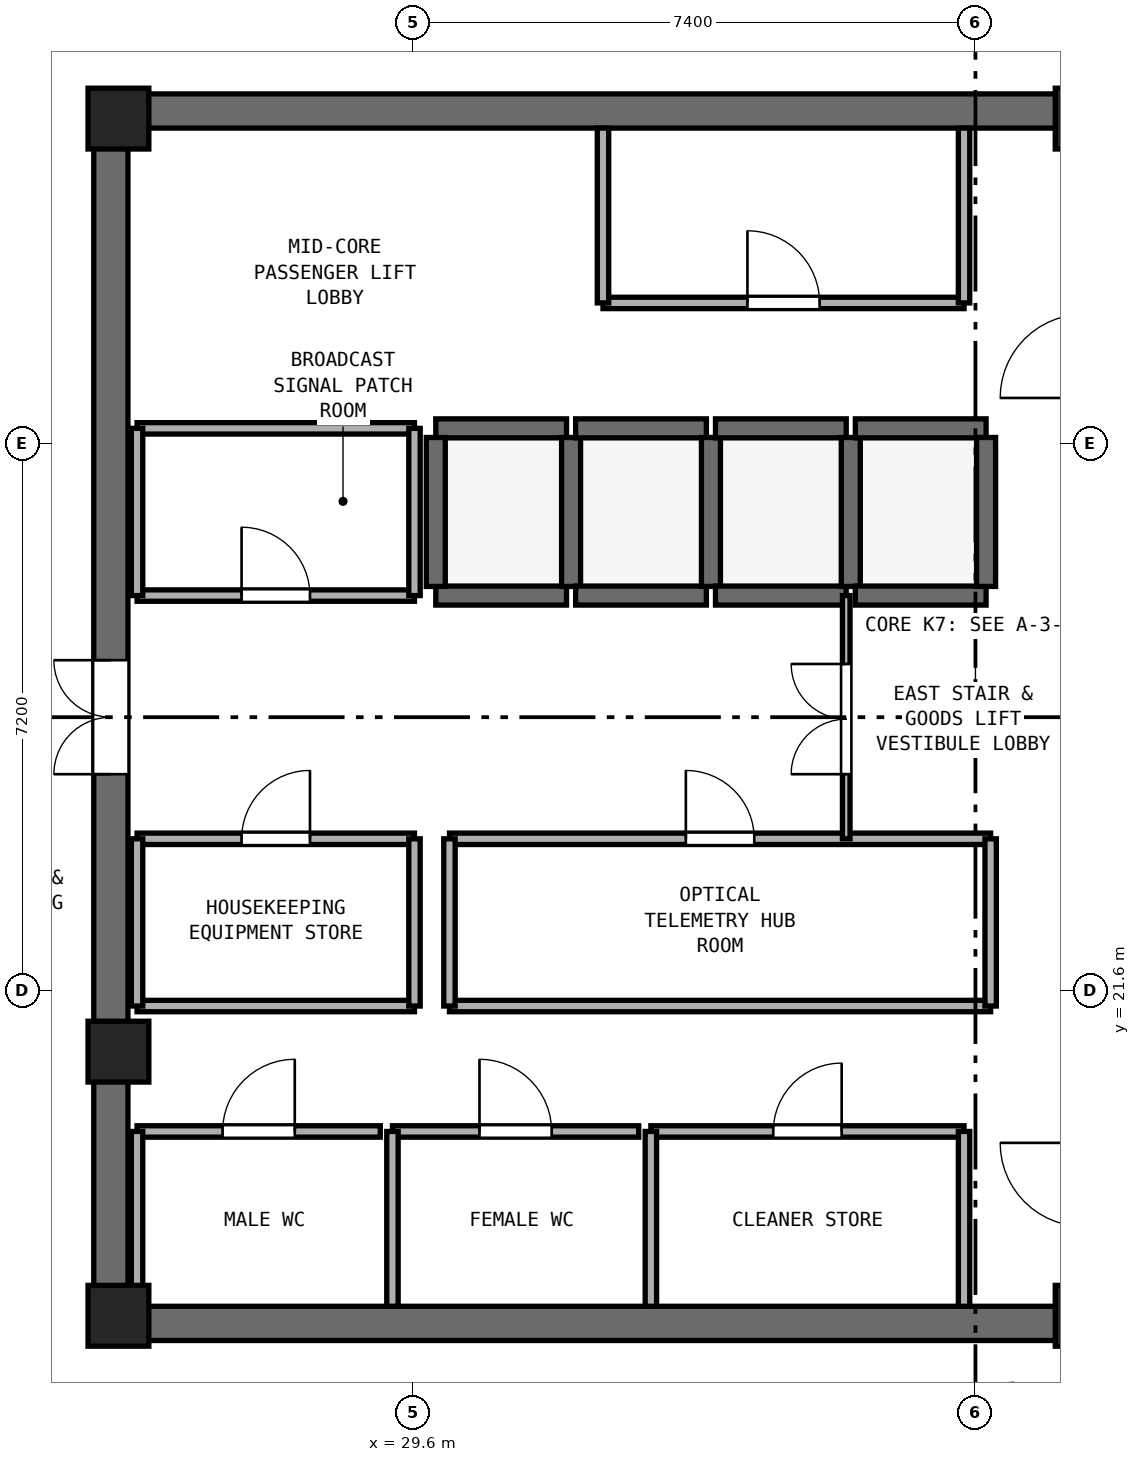
"""IFC4 building model, lengths in metres.
Left out: names, types, materials, properties, quantities, classifications, styles, units other than length and angle.
Written with IfcOpenShell. Run it as: python <this file> out.ifc"""

import sys

from ifc_helpers import new_model, si_unit, direction, frame, frame_2d, origin, origin_2d, place, context, subcontext, project, spatial, rectangle, extrude, element, fill, save


model = new_model("IFC4")
c1 = context("Model", 3, precision=1e-05, world=origin(), true_north=direction((0.0, 1.0)))
c2 = subcontext(c1, "Body", "Model", "MODEL_VIEW")
j1 = project(units=[si_unit("LENGTHUNIT", "METRE"), si_unit("PLANEANGLEUNIT", "RADIAN")], contexts=[c1])
p1 = place(None, origin())
s1 = spatial("IfcSite", under=j1, at=p1, CompositionType="ELEMENT")
p2 = place(p1, origin())
s2 = spatial("IfcBuilding", under=s1, at=p2, CompositionType="ELEMENT")
p3 = place(p2, frame((0.0, 0.0, 308.6)))
s3 = spatial("IfcBuildingStorey", under=s2, at=p3, CompositionType="ELEMENT", Elevation=308.6)
for number, where, z_axis, x_axis in (
    (1, (25.4, 17.225, 0.0), (0.0, 0.0, 1.0), (1.0, 0.0, 0.0)),
    (2, (25.4, 33.175, 0.0), (0.0, 0.0, 1.0), (1.0, 0.0, 0.0)),
):
    element("IfcWall", number, at=place(p3, frame(where, z_axis=z_axis, x_axis=x_axis)), inside=s3, PredefinedType="SHEAR", context=c2, shape_type="SweptSolid", body=[
        extrude(rectangle(XDim=23.2, YDim=0.45, at=frame_2d((11.6, 0.0))), origin(), (0.0, 0.0, 1.0), 4.52),
    ])
p4 = place(p3, frame((25.625, 17.45, 0.0), z_axis=(0.0, 0.0, 1.0), x_axis=(0.0, 1.0, 0.0)))
e3 = element("IfcWall", 3, at=p4, inside=s3, PredefinedType="SHEAR", context=c2, shape_type="SweptSolid", body=[
    extrude(rectangle(XDim=15.5, YDim=0.45, at=frame_2d((7.75, 0.0))), origin(), (0.0, 0.0, 1.0), 4.52),
])
p5 = place(p4, frame((7.0, 0.0, 0.0)))
e4 = element("IfcOpeningElement", 4, at=p5, cuts=e3, PredefinedType="OPENING", context=c2, shape_type="SweptSolid", body=[
    extrude(rectangle(XDim=1.5, YDim=2.15, at=frame_2d((0.75, 1.075))), frame((0.0, 0.235, 0.0), z_axis=(0.0, -1.0, 0.0), x_axis=(1.0, 0.0, 0.0)), (0.0, 0.0, 1.0), 0.47),
])
for number, where, z_axis, x_axis in (
    (5, (25.725, 17.325, 0.0), (0.0, 0.0, 1.0), (1.0, 0.0, 0.0)),
    (6, (38.45, 17.325, 0.0), (0.0, 0.0, 1.0), (1.0, 0.0, 0.0)),
    (7, (38.45, 33.075, 0.0), (0.0, 0.0, 1.0), (1.0, 0.0, 0.0)),
    (8, (25.725, 33.075, 0.0), (0.0, 0.0, 1.0), (1.0, 0.0, 0.0)),
    (9, (25.725, 20.8, 0.0), (0.0, 0.0, 1.0), (1.0, 0.0, 0.0)),
):
    element("IfcColumn", number, at=place(p3, frame(where, z_axis=z_axis, x_axis=x_axis)), inside=s3, PredefinedType="PILASTER", context=c2, shape_type="SweptSolid", body=[
        extrude(rectangle(XDim=0.8, YDim=0.8, at=origin_2d()), origin(), (0.0, 0.0, 1.0), 4.8),
    ])
for number, where, z_axis, x_axis in (
    (10, (29.9, 26.8, 0.0), (0.0, 0.0, 1.0), (1.0, 0.0, 0.0)),
    (11, (29.9, 29.0, 0.0), (0.0, 0.0, 1.0), (1.0, 0.0, 0.0)),
):
    element("IfcWall", number, at=place(p3, frame(where, z_axis=z_axis, x_axis=x_axis)), inside=s3, PredefinedType="SHEAR", context=c2, shape_type="SweptSolid", body=[
        extrude(rectangle(XDim=1.72, YDim=0.25, at=frame_2d((0.86, 0.0))), origin(), (0.0, 0.0, 1.0), 4.52),
    ])
for number, where, z_axis, x_axis in (
    (12, (29.9, 26.92, 0.0), (0.0, 0.0, 1.0), (0.0, 1.0, 0.0)),
    (13, (31.68, 26.92, 0.0), (0.0, 0.0, 1.0), (0.0, 1.0, 0.0)),
):
    element("IfcWall", number, at=place(p3, frame(where, z_axis=z_axis, x_axis=x_axis)), inside=s3, PredefinedType="SHEAR", context=c2, shape_type="SweptSolid", body=[
        extrude(rectangle(XDim=1.96, YDim=0.25, at=frame_2d((0.98, 0.0))), origin(), (0.0, 0.0, 1.0), 4.52),
    ])
for number, where, z_axis, x_axis in (
    (14, (31.74, 26.8, 0.0), (0.0, 0.0, 1.0), (1.0, 0.0, 0.0)),
    (15, (31.74, 29.0, 0.0), (0.0, 0.0, 1.0), (1.0, 0.0, 0.0)),
):
    element("IfcWall", number, at=place(p3, frame(where, z_axis=z_axis, x_axis=x_axis)), inside=s3, PredefinedType="SHEAR", context=c2, shape_type="SweptSolid", body=[
        extrude(rectangle(XDim=1.72, YDim=0.25, at=frame_2d((0.86, 0.0))), origin(), (0.0, 0.0, 1.0), 4.52),
    ])
p6 = place(p3, frame((33.52, 26.92, 0.0), z_axis=(0.0, 0.0, 1.0), x_axis=(0.0, 1.0, 0.0)))
e16 = element("IfcWall", 16, at=p6, inside=s3, PredefinedType="SHEAR", context=c2, shape_type="SweptSolid", body=[
    extrude(rectangle(XDim=1.96, YDim=0.25, at=frame_2d((0.98, 0.0))), origin(), (0.0, 0.0, 1.0), 4.52),
])
for number, where, z_axis, x_axis in (
    (17, (33.58, 26.8, 0.0), (0.0, 0.0, 1.0), (1.0, 0.0, 0.0)),
    (18, (33.58, 29.0, 0.0), (0.0, 0.0, 1.0), (1.0, 0.0, 0.0)),
):
    element("IfcWall", number, at=place(p3, frame(where, z_axis=z_axis, x_axis=x_axis)), inside=s3, PredefinedType="SHEAR", context=c2, shape_type="SweptSolid", body=[
        extrude(rectangle(XDim=1.72, YDim=0.25, at=frame_2d((0.86, 0.0))), origin(), (0.0, 0.0, 1.0), 4.52),
    ])
p7 = place(p3, frame((35.36, 26.92, 0.0), z_axis=(0.0, 0.0, 1.0), x_axis=(0.0, 1.0, 0.0)))
e19 = element("IfcWall", 19, at=p7, inside=s3, PredefinedType="SHEAR", context=c2, shape_type="SweptSolid", body=[
    extrude(rectangle(XDim=1.96, YDim=0.25, at=frame_2d((0.98, 0.0))), origin(), (0.0, 0.0, 1.0), 4.52),
])
for number, where, z_axis, x_axis in (
    (20, (35.42, 26.8, 0.0), (0.0, 0.0, 1.0), (1.0, 0.0, 0.0)),
    (21, (35.42, 29.0, 0.0), (0.0, 0.0, 1.0), (1.0, 0.0, 0.0)),
):
    element("IfcWall", number, at=place(p3, frame(where, z_axis=z_axis, x_axis=x_axis)), inside=s3, PredefinedType="SHEAR", context=c2, shape_type="SweptSolid", body=[
        extrude(rectangle(XDim=1.72, YDim=0.25, at=frame_2d((0.86, 0.0))), origin(), (0.0, 0.0, 1.0), 4.52),
    ])
p8 = place(p3, frame((37.14, 26.92, 0.0), z_axis=(0.0, 0.0, 1.0), x_axis=(0.0, 1.0, 0.0)))
e22 = element("IfcWall", 22, at=p8, inside=s3, PredefinedType="SHEAR", context=c2, shape_type="SweptSolid", body=[
    extrude(rectangle(XDim=1.96, YDim=0.25, at=frame_2d((0.98, 0.0))), origin(), (0.0, 0.0, 1.0), 4.52),
])
p9 = place(p3, frame((32.1, 30.65, 0.0), z_axis=(0.0, 0.0, 1.0), x_axis=(1.0, 0.0, 0.0)))
e23 = element("IfcWall", 23, at=p9, inside=s3, PredefinedType="PARTITIONING", context=c2, shape_type="SweptSolid", body=[
    extrude(rectangle(XDim=4.75, YDim=0.15, at=frame_2d((2.375, 0.0))), origin(), (0.0, 0.0, 1.0), 4.52),
])
p10 = place(p9, frame((1.9, 0.0, 0.0)))
e24 = element("IfcOpeningElement", 24, at=p10, cuts=e23, PredefinedType="OPENING", context=c2, shape_type="SweptSolid", body=[
    extrude(rectangle(XDim=0.95, YDim=2.1, at=frame_2d((0.475, 1.05))), frame((0.0, 0.085, 0.0), z_axis=(0.0, -1.0, 0.0), x_axis=(1.0, 0.0, 0.0)), (0.0, 0.0, 1.0), 0.17),
])
for number, where, z_axis, x_axis in (
    (25, (32.1, 30.65, 0.0), (0.0, 0.0, 1.0), (0.0, 1.0, 0.0)),
    (26, (36.85, 30.65, 0.0), (0.0, 0.0, 1.0), (0.0, 1.0, 0.0)),
):
    element("IfcWall", number, at=place(p3, frame(where, z_axis=z_axis, x_axis=x_axis)), inside=s3, PredefinedType="PARTITIONING", context=c2, shape_type="SweptSolid", body=[
        extrude(rectangle(XDim=2.3, YDim=0.15, at=frame_2d((1.15, 0.0))), origin(), (0.0, 0.0, 1.0), 4.52),
    ])
p11 = place(p3, frame((25.97, 19.75, 0.0), z_axis=(0.0, 0.0, 1.0), x_axis=(1.0, 0.0, 0.0)))
e27 = element("IfcWall", 27, at=p11, inside=s3, PredefinedType="PARTITIONING", context=c2, shape_type="SweptSolid", body=[
    extrude(rectangle(XDim=3.2, YDim=0.15, at=frame_2d((1.6, 0.0))), origin(), (0.0, 0.0, 1.0), 4.52),
])
p12 = place(p11, frame((1.125, 0.0, 0.0)))
e28 = element("IfcOpeningElement", 28, at=p12, cuts=e27, PredefinedType="OPENING", context=c2, shape_type="SweptSolid", body=[
    extrude(rectangle(XDim=0.95, YDim=2.1, at=frame_2d((0.475, 1.05))), frame((0.0, 0.085, 0.0), z_axis=(0.0, -1.0, 0.0), x_axis=(1.0, 0.0, 0.0)), (0.0, 0.0, 1.0), 0.17),
])
p13 = place(p3, frame((25.97, 17.45, 0.0), z_axis=(0.0, 0.0, 1.0), x_axis=(0.0, 1.0, 0.0)))
e29 = element("IfcWall", 29, at=p13, inside=s3, PredefinedType="PARTITIONING", context=c2, shape_type="SweptSolid", body=[
    extrude(rectangle(XDim=2.3, YDim=0.15, at=frame_2d((1.15, 0.0))), origin(), (0.0, 0.0, 1.0), 3.62),
])
p14 = place(p3, frame((29.33, 19.75, 0.0), z_axis=(0.0, 0.0, 1.0), x_axis=(1.0, 0.0, 0.0)))
e30 = element("IfcWall", 30, at=p14, inside=s3, PredefinedType="PARTITIONING", context=c2, shape_type="SweptSolid", body=[
    extrude(rectangle(XDim=3.24, YDim=0.15, at=frame_2d((1.62, 0.0))), origin(), (0.0, 0.0, 1.0), 4.52),
])
p15 = place(p14, frame((1.145, 0.0, 0.0)))
e31 = element("IfcOpeningElement", 31, at=p15, cuts=e30, PredefinedType="OPENING", context=c2, shape_type="SweptSolid", body=[
    extrude(rectangle(XDim=0.95, YDim=2.1, at=frame_2d((0.475, 1.05))), frame((0.0, 0.085, 0.0), z_axis=(0.0, -1.0, 0.0), x_axis=(1.0, 0.0, 0.0)), (0.0, 0.0, 1.0), 0.17),
])
p16 = place(p3, frame((29.33, 17.45, 0.0), z_axis=(0.0, 0.0, 1.0), x_axis=(0.0, 1.0, 0.0)))
e32 = element("IfcWall", 32, at=p16, inside=s3, PredefinedType="PARTITIONING", context=c2, shape_type="SweptSolid", body=[
    extrude(rectangle(XDim=2.3, YDim=0.15, at=frame_2d((1.15, 0.0))), origin(), (0.0, 0.0, 1.0), 4.52),
])
p17 = place(p3, frame((32.73, 19.75, 0.0), z_axis=(0.0, 0.0, 1.0), x_axis=(1.0, 0.0, 0.0)))
e33 = element("IfcWall", 33, at=p17, inside=s3, PredefinedType="PARTITIONING", context=c2, shape_type="SweptSolid", body=[
    extrude(rectangle(XDim=4.12, YDim=0.15, at=frame_2d((2.06, 0.0))), origin(), (0.0, 0.0, 1.0), 4.52),
])
p18 = place(p17, frame((1.61, 0.0, 0.0)))
e34 = element("IfcOpeningElement", 34, at=p18, cuts=e33, PredefinedType="OPENING", context=c2, shape_type="SweptSolid", body=[
    extrude(rectangle(XDim=0.9, YDim=2.1, at=frame_2d((0.45, 1.05))), frame((0.0, 0.085, 0.0), z_axis=(0.0, -1.0, 0.0), x_axis=(1.0, 0.0, 0.0)), (0.0, 0.0, 1.0), 0.17),
])
for number, where, z_axis, x_axis in (
    (35, (32.73, 17.45, 0.0), (0.0, 0.0, 1.0), (0.0, 1.0, 0.0)),
    (36, (36.85, 17.45, 0.0), (0.0, 0.0, 1.0), (0.0, 1.0, 0.0)),
):
    element("IfcWall", number, at=place(p3, frame(where, z_axis=z_axis, x_axis=x_axis)), inside=s3, PredefinedType="PARTITIONING", context=c2, shape_type="SweptSolid", body=[
        extrude(rectangle(XDim=2.3, YDim=0.15, at=frame_2d((1.15, 0.0))), origin(), (0.0, 0.0, 1.0), 4.52),
    ])
p19 = place(p3, frame((25.97, 26.8, 0.0), z_axis=(0.0, 0.0, 1.0), x_axis=(1.0, 0.0, 0.0)))
e37 = element("IfcWall", 37, at=p19, inside=s3, PredefinedType="PARTITIONING", context=c2, shape_type="SweptSolid", body=[
    extrude(rectangle(XDim=3.65, YDim=0.15, at=frame_2d((1.825, 0.0))), origin(), (0.0, 0.0, 1.0), 4.52),
])
p20 = place(p19, frame((1.375, 0.0, 0.0)))
e38 = element("IfcOpeningElement", 38, at=p20, cuts=e37, PredefinedType="OPENING", context=c2, shape_type="SweptSolid", body=[
    extrude(rectangle(XDim=0.9, YDim=2.1, at=frame_2d((0.45, 1.05))), frame((0.0, 0.085, 0.0), z_axis=(0.0, -1.0, 0.0), x_axis=(1.0, 0.0, 0.0)), (0.0, 0.0, 1.0), 0.17),
])
p21 = place(p3, frame((25.97, 29.0, 0.0), z_axis=(0.0, 0.0, 1.0), x_axis=(1.0, 0.0, 0.0)))
e39 = element("IfcWall", 39, at=p21, inside=s3, PredefinedType="PARTITIONING", context=c2, shape_type="SweptSolid", body=[
    extrude(rectangle(XDim=3.65, YDim=0.15, at=frame_2d((1.825, 0.0))), origin(), (0.0, 0.0, 1.0), 4.52),
])
p22 = place(p3, frame((25.97, 26.8, 0.0), z_axis=(0.0, 0.0, 1.0), x_axis=(0.0, 1.0, 0.0)))
e40 = element("IfcWall", 40, at=p22, inside=s3, PredefinedType="PARTITIONING", context=c2, shape_type="SweptSolid", body=[
    extrude(rectangle(XDim=2.2, YDim=0.15, at=frame_2d((1.1, 0.0))), origin(), (0.0, 0.0, 1.0), 3.62),
])
p23 = place(p3, frame((29.62, 26.8, 0.0), z_axis=(0.0, 0.0, 1.0), x_axis=(0.0, 1.0, 0.0)))
e41 = element("IfcWall", 41, at=p23, inside=s3, PredefinedType="PARTITIONING", context=c2, shape_type="SweptSolid", body=[
    extrude(rectangle(XDim=2.2, YDim=0.15, at=frame_2d((1.1, 0.0))), origin(), (0.0, 0.0, 1.0), 4.52),
])
p24 = place(p3, frame((25.97, 21.4, 0.0), z_axis=(0.0, 0.0, 1.0), x_axis=(1.0, 0.0, 0.0)))
e42 = element("IfcWall", 42, at=p24, inside=s3, PredefinedType="PARTITIONING", context=c2, shape_type="SweptSolid", body=[
    extrude(rectangle(XDim=3.65, YDim=0.15, at=frame_2d((1.825, 0.0))), origin(), (0.0, 0.0, 1.0), 4.52),
])
p25 = place(p3, frame((25.97, 23.6, 0.0), z_axis=(0.0, 0.0, 1.0), x_axis=(1.0, 0.0, 0.0)))
e43 = element("IfcWall", 43, at=p25, inside=s3, PredefinedType="PARTITIONING", context=c2, shape_type="SweptSolid", body=[
    extrude(rectangle(XDim=3.65, YDim=0.15, at=frame_2d((1.825, 0.0))), origin(), (0.0, 0.0, 1.0), 4.52),
])
p26 = place(p25, frame((1.375, 0.0, 0.0)))
e44 = element("IfcOpeningElement", 44, at=p26, cuts=e43, PredefinedType="OPENING", context=c2, shape_type="SweptSolid", body=[
    extrude(rectangle(XDim=0.9, YDim=2.1, at=frame_2d((0.45, 1.05))), frame((0.0, 0.085, 0.0), z_axis=(0.0, -1.0, 0.0), x_axis=(1.0, 0.0, 0.0)), (0.0, 0.0, 1.0), 0.17),
])
p27 = place(p3, frame((25.97, 21.4, 0.0), z_axis=(0.0, 0.0, 1.0), x_axis=(0.0, 1.0, 0.0)))
e45 = element("IfcWall", 45, at=p27, inside=s3, PredefinedType="PARTITIONING", context=c2, shape_type="SweptSolid", body=[
    extrude(rectangle(XDim=2.2, YDim=0.15, at=frame_2d((1.1, 0.0))), origin(), (0.0, 0.0, 1.0), 3.62),
])
p28 = place(p3, frame((29.62, 21.4, 0.0), z_axis=(0.0, 0.0, 1.0), x_axis=(0.0, 1.0, 0.0)))
e46 = element("IfcWall", 46, at=p28, inside=s3, PredefinedType="PARTITIONING", context=c2, shape_type="SweptSolid", body=[
    extrude(rectangle(XDim=2.2, YDim=0.15, at=frame_2d((1.1, 0.0))), origin(), (0.0, 0.0, 1.0), 4.52),
])
p29 = place(p3, frame((30.08, 21.4, 0.0), z_axis=(0.0, 0.0, 1.0), x_axis=(1.0, 0.0, 0.0)))
e47 = element("IfcWall", 47, at=p29, inside=s3, PredefinedType="PARTITIONING", context=c2, shape_type="SweptSolid", body=[
    extrude(rectangle(XDim=7.12, YDim=0.15, at=frame_2d((3.56, 0.0))), origin(), (0.0, 0.0, 1.0), 4.52),
])
p30 = place(p3, frame((30.08, 23.6, 0.0), z_axis=(0.0, 0.0, 1.0), x_axis=(1.0, 0.0, 0.0)))
e48 = element("IfcWall", 48, at=p30, inside=s3, PredefinedType="PARTITIONING", context=c2, shape_type="SweptSolid", body=[
    extrude(rectangle(XDim=7.12, YDim=0.15, at=frame_2d((3.56, 0.0))), origin(), (0.0, 0.0, 1.0), 4.52),
])
p31 = place(p30, frame((3.11, 0.0, 0.0)))
e49 = element("IfcOpeningElement", 49, at=p31, cuts=e48, PredefinedType="OPENING", context=c2, shape_type="SweptSolid", body=[
    extrude(rectangle(XDim=0.9, YDim=2.1, at=frame_2d((0.45, 1.05))), frame((0.0, 0.085, 0.0), z_axis=(0.0, -1.0, 0.0), x_axis=(1.0, 0.0, 0.0)), (0.0, 0.0, 1.0), 0.17),
])
p32 = place(p3, frame((30.08, 21.4, 0.0), z_axis=(0.0, 0.0, 1.0), x_axis=(0.0, 1.0, 0.0)))
e50 = element("IfcWall", 50, at=p32, inside=s3, PredefinedType="PARTITIONING", context=c2, shape_type="SweptSolid", body=[
    extrude(rectangle(XDim=2.2, YDim=0.15, at=frame_2d((1.1, 0.0))), origin(), (0.0, 0.0, 1.0), 2.12),
])
p33 = place(p3, frame((37.2, 21.4, 0.0), z_axis=(0.0, 0.0, 1.0), x_axis=(0.0, 1.0, 0.0)))
e51 = element("IfcWall", 51, at=p33, inside=s3, PredefinedType="PARTITIONING", context=c2, shape_type="SweptSolid", body=[
    extrude(rectangle(XDim=2.2, YDim=0.15, at=frame_2d((1.1, 0.0))), origin(), (0.0, 0.0, 1.0), 4.52),
])
p34 = place(p3, frame((35.3, 23.6, 0.0), z_axis=(0.0, 0.0, 1.0), x_axis=(0.0, 1.0, 0.0)))
e52 = element("IfcWall", 52, at=p34, inside=s3, PredefinedType="PARTITIONING", context=c2, shape_type="SweptSolid", body=[
    extrude(rectangle(XDim=3.2, YDim=0.1, at=frame_2d((1.6, 0.0))), origin(), (0.0, 0.0, 1.0), 4.52),
])
p35 = place(p34, frame((0.85, 0.0, 0.0)))
e53 = element("IfcOpeningElement", 53, at=p35, cuts=e52, PredefinedType="OPENING", context=c2, shape_type="SweptSolid", body=[
    extrude(rectangle(XDim=1.45, YDim=2.12, at=frame_2d((0.725, 1.06))), frame((0.0, 0.06, 0.0), z_axis=(0.0, -1.0, 0.0), x_axis=(1.0, 0.0, 0.0)), (0.0, 0.0, 1.0), 0.12),
])
p36 = place(p5, origin())
e54 = element("IfcDoor", 54, at=p36, inside=s3, OperationType="DOUBLE_DOOR_SINGLE_SWING", PredefinedType="DOOR", context=c2, shape_type="SweptSolid", body=[
    extrude(rectangle(XDim=1.5, YDim=2.15, at=frame_2d((0.75, 1.075))), frame((0.0, 0.025, 0.0), z_axis=(0.0, -1.0, 0.0), x_axis=(1.0, 0.0, 0.0)), (0.0, 0.0, 1.0), 0.05),
])
fill(e4, e54)
p37 = place(p10, origin())
e55 = element("IfcDoor", 55, at=p37, inside=s3, OperationType="SINGLE_SWING_LEFT", PredefinedType="DOOR", context=c2, shape_type="SweptSolid", body=[
    extrude(rectangle(XDim=0.95, YDim=2.1, at=frame_2d((0.475, 1.05))), frame((0.0, 0.025, 0.0), z_axis=(0.0, -1.0, 0.0), x_axis=(1.0, 0.0, 0.0)), (0.0, 0.0, 1.0), 0.05),
])
fill(e24, e55)
p38 = place(p12, origin())
e56 = element("IfcDoor", 56, at=p38, inside=s3, OperationType="SINGLE_SWING_RIGHT", PredefinedType="DOOR", context=c2, shape_type="SweptSolid", body=[
    extrude(rectangle(XDim=0.95, YDim=2.1, at=frame_2d((0.475, 1.05))), frame((0.0, 0.025, 0.0), z_axis=(0.0, -1.0, 0.0), x_axis=(1.0, 0.0, 0.0)), (0.0, 0.0, 1.0), 0.05),
])
fill(e28, e56)
p39 = place(p15, origin())
e57 = element("IfcDoor", 57, at=p39, inside=s3, OperationType="SINGLE_SWING_LEFT", PredefinedType="DOOR", context=c2, shape_type="SweptSolid", body=[
    extrude(rectangle(XDim=0.95, YDim=2.1, at=frame_2d((0.475, 1.05))), frame((0.0, 0.025, 0.0), z_axis=(0.0, -1.0, 0.0), x_axis=(1.0, 0.0, 0.0)), (0.0, 0.0, 1.0), 0.05),
])
fill(e31, e57)
p40 = place(p18, origin())
e58 = element("IfcDoor", 58, at=p40, inside=s3, OperationType="SINGLE_SWING_RIGHT", PredefinedType="DOOR", context=c2, shape_type="SweptSolid", body=[
    extrude(rectangle(XDim=0.9, YDim=2.1, at=frame_2d((0.45, 1.05))), frame((0.0, 0.025, 0.0), z_axis=(0.0, -1.0, 0.0), x_axis=(1.0, 0.0, 0.0)), (0.0, 0.0, 1.0), 0.05),
])
fill(e34, e58)
p41 = place(p20, origin())
e59 = element("IfcDoor", 59, at=p41, inside=s3, OperationType="SINGLE_SWING_LEFT", PredefinedType="DOOR", context=c2, shape_type="SweptSolid", body=[
    extrude(rectangle(XDim=0.9, YDim=2.1, at=frame_2d((0.45, 1.05))), frame((0.0, 0.025, 0.0), z_axis=(0.0, -1.0, 0.0), x_axis=(1.0, 0.0, 0.0)), (0.0, 0.0, 1.0), 0.05),
])
fill(e38, e59)
p42 = place(p26, origin())
e60 = element("IfcDoor", 60, at=p42, inside=s3, OperationType="SINGLE_SWING_RIGHT", PredefinedType="DOOR", context=c2, shape_type="SweptSolid", body=[
    extrude(rectangle(XDim=0.9, YDim=2.1, at=frame_2d((0.45, 1.05))), frame((0.0, 0.025, 0.0), z_axis=(0.0, -1.0, 0.0), x_axis=(1.0, 0.0, 0.0)), (0.0, 0.0, 1.0), 0.05),
])
fill(e44, e60)
p43 = place(p31, origin())
e61 = element("IfcDoor", 61, at=p43, inside=s3, OperationType="SINGLE_SWING_LEFT", PredefinedType="DOOR", context=c2, shape_type="SweptSolid", body=[
    extrude(rectangle(XDim=0.9, YDim=2.1, at=frame_2d((0.45, 1.05))), frame((0.0, 0.025, 0.0), z_axis=(0.0, -1.0, 0.0), x_axis=(1.0, 0.0, 0.0)), (0.0, 0.0, 1.0), 0.05),
])
fill(e49, e61)
p44 = place(p35, origin())
e62 = element("IfcDoor", 62, at=p44, inside=s3, OperationType="DOUBLE_DOOR_SINGLE_SWING", PredefinedType="DOOR", context=c2, shape_type="SweptSolid", body=[
    extrude(rectangle(XDim=1.45, YDim=2.12, at=frame_2d((0.725, 1.06))), frame((0.0, 0.025, 0.0), z_axis=(0.0, -1.0, 0.0), x_axis=(1.0, 0.0, 0.0)), (0.0, 0.0, 1.0), 0.05),
])
fill(e53, e62)
save(model, sys.argv[1])
